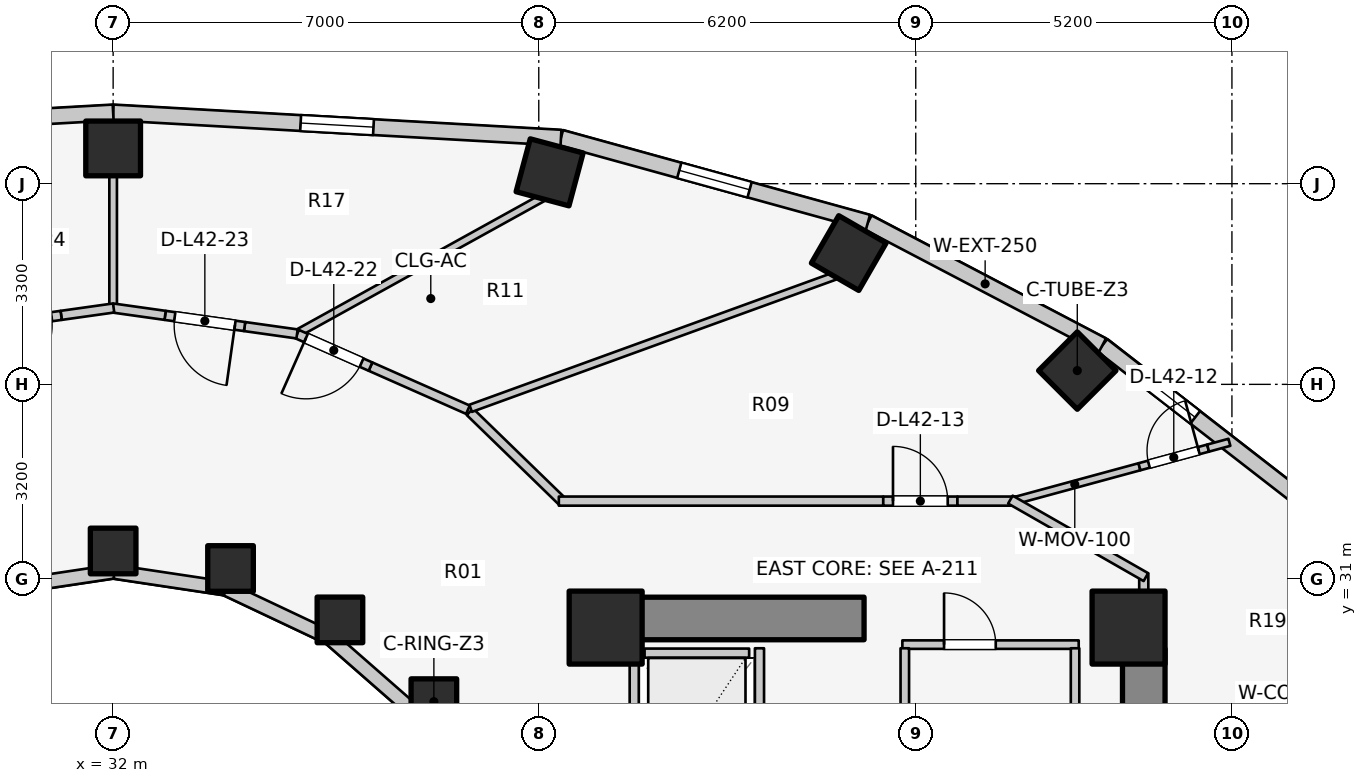
"""IFC4 building model, lengths in metres.
Left out: names, types, materials, properties, quantities, classifications, styles, units other than length and angle.
Written with IfcOpenShell. Run it as: python <this file> out.ifc"""

import sys

from ifc_helpers import new_model, si_unit, direction, frame, frame_2d, origin, origin_2d, place, context, subcontext, project, spatial, rectangle, extrude, element, fill, save


model = new_model("IFC4")
c1 = context("Model", 3, precision=1e-05, world=origin(), true_north=direction((0.0, 1.0)))
c2 = subcontext(c1, "Body", "Model", "MODEL_VIEW")
j1 = project(units=[si_unit("LENGTHUNIT", "METRE"), si_unit("PLANEANGLEUNIT", "RADIAN")], contexts=[c1])
p1 = place(None, origin())
s1 = spatial("IfcSite", under=j1, at=p1, CompositionType="ELEMENT")
p2 = place(p1, origin())
s2 = spatial("IfcBuilding", under=s1, at=p2, CompositionType="ELEMENT")
p3 = place(p2, frame((0.0, 0.0, 140.5)))
s3 = spatial("IfcBuildingStorey", under=s2, at=p3, CompositionType="ELEMENT", Elevation=140.5)
p4 = place(p3, frame((48.95, 17.05, 0.0), z_axis=(0.0, 0.0, 1.0), x_axis=(0.0, 1.0, 0.0)))
e1 = element("IfcWall", 1, at=p4, inside=s3, PredefinedType="SHEAR", context=c2, shape_type="SweptSolid", body=[
    extrude(rectangle(XDim=12.8, YDim=0.7, at=frame_2d((6.4, 0.0))), origin(), (0.0, 0.0, 1.0), 3.1),
])
p5 = place(p3, frame((39.85, 30.35, 0.0), z_axis=(0.0, 0.0, 1.0), x_axis=(1.0, 0.0, 0.0)))
e2 = element("IfcWall", 2, at=p5, inside=s3, PredefinedType="SHEAR", context=c2, shape_type="SweptSolid", body=[
    extrude(rectangle(XDim=4.5, YDim=0.7, at=frame_2d((2.25, 0.0))), origin(), (0.0, 0.0, 1.0), 3.1),
])
for number, where, z_axis, x_axis in (
    (3, (48.7, 30.2, 0.0), (0.0, 0.0, 1.0), (1.0, 0.0, 0.0)),
    (4, (40.1, 30.2, 0.0), (0.0, 0.0, 1.0), (1.0, 0.0, 0.0)),
):
    element("IfcColumn", number, at=place(p3, frame(where, z_axis=z_axis, x_axis=x_axis)), inside=s3, PredefinedType="COLUMN", context=c2, shape_type="SweptSolid", body=[
        extrude(rectangle(XDim=1.2, YDim=1.2, at=origin_2d()), origin(), (0.0, 0.0, 1.0), 3.1),
    ])
p6 = place(p3, frame((37.275, 28.982, 0.0), z_axis=(0.0, 0.0, 1.0), x_axis=(1.0, 0.0, 0.0)))
e5 = element("IfcColumn", 5, at=p6, inside=s3, PredefinedType="COLUMN", context=c2, shape_type="SweptSolid", body=[
    extrude(rectangle(XDim=0.75, YDim=0.75, at=origin_2d()), origin(), (0.0, 0.0, 1.0), 3.1),
])
p7 = place(p3, frame((47.857, 34.427, 0.0), z_axis=(0.0, 0.0, 1.0), x_axis=(0.707106781187, 0.707106781187, 0.0)))
e6 = element("IfcColumn", 6, at=p7, inside=s3, PredefinedType="COLUMN", context=c2, shape_type="SweptSolid", body=[
    extrude(rectangle(XDim=0.9, YDim=0.9, at=origin_2d()), origin(), (0.0, 0.0, 1.0), 3.1),
])
p8 = place(p3, frame((35.73, 30.327, 0.0), z_axis=(0.0, 0.0, 1.0), x_axis=(1.0, 0.0, 0.0)))
e7 = element("IfcColumn", 7, at=p8, inside=s3, PredefinedType="COLUMN", context=c2, shape_type="SweptSolid", body=[
    extrude(rectangle(XDim=0.75, YDim=0.75, at=origin_2d()), origin(), (0.0, 0.0, 1.0), 3.1),
])
p9 = place(p3, frame((44.098, 36.359, 0.0), z_axis=(0.0, 0.0, 1.0), x_axis=(0.5, 0.866025403784, 0.0)))
e8 = element("IfcColumn", 8, at=p9, inside=s3, PredefinedType="COLUMN", context=c2, shape_type="SweptSolid", body=[
    extrude(rectangle(XDim=0.9, YDim=0.9, at=origin_2d()), origin(), (0.0, 0.0, 1.0), 3.1),
])
p10 = place(p3, frame((33.931, 31.172, 0.0), z_axis=(0.0, 0.0, 1.0), x_axis=(1.0, 0.0, 0.0)))
e9 = element("IfcColumn", 9, at=p10, inside=s3, PredefinedType="COLUMN", context=c2, shape_type="SweptSolid", body=[
    extrude(rectangle(XDim=0.75, YDim=0.75, at=origin_2d()), origin(), (0.0, 0.0, 1.0), 3.1),
])
p11 = place(p3, frame((39.178, 37.687, 0.0), z_axis=(0.0, 0.0, 1.0), x_axis=(0.258819045103, 0.965925826289, 0.0)))
e10 = element("IfcColumn", 10, at=p11, inside=s3, PredefinedType="COLUMN", context=c2, shape_type="SweptSolid", body=[
    extrude(rectangle(XDim=0.9, YDim=0.9, at=origin_2d()), origin(), (0.0, 0.0, 1.0), 3.1),
])
p12 = place(p3, frame((32.0, 31.46, 0.0), z_axis=(0.0, 0.0, 1.0), x_axis=(1.0, 0.0, 0.0)))
e11 = element("IfcColumn", 11, at=p12, inside=s3, PredefinedType="COLUMN", context=c2, shape_type="SweptSolid", body=[
    extrude(rectangle(XDim=0.75, YDim=0.75, at=origin_2d()), origin(), (0.0, 0.0, 1.0), 3.1),
])
p13 = place(p3, frame((32.0, 38.08, 0.0), z_axis=(0.0, 0.0, 1.0), x_axis=(0.0, 1.0, 0.0)))
e12 = element("IfcColumn", 12, at=p13, inside=s3, PredefinedType="COLUMN", context=c2, shape_type="SweptSolid", body=[
    extrude(rectangle(XDim=0.9, YDim=0.9, at=origin_2d()), origin(), (0.0, 0.0, 1.0), 3.1),
])
p14 = place(p3, frame((37.035, 28.742, 0.0), z_axis=(0.0, 0.0, 1.0), x_axis=(-0.752576694707, 0.658504607869, 0.0)))
e13 = element("IfcWall", 13, at=p14, inside=s3, PredefinedType="STANDARD", context=c2, shape_type="SweptSolid", body=[
    extrude(rectangle(XDim=1.959, YDim=0.23, at=frame_2d((0.98, 0.0))), origin(), (0.0, 0.0, 1.0), 1.22),
])
p15 = place(p3, frame((35.56, 30.032, 0.0), z_axis=(0.0, 0.0, 1.0), x_axis=(-0.904179699603, 0.427152280606, 0.0)))
e14 = element("IfcWall", 14, at=p15, inside=s3, PredefinedType="STANDARD", context=c2, shape_type="SweptSolid", body=[
    extrude(rectangle(XDim=1.899, YDim=0.23, at=frame_2d((0.95, 0.0))), origin(), (0.0, 0.0, 1.0), 1.22),
])
for number, where, z_axis, x_axis in (
    (15, (33.843, 30.843, 0.0), (0.0, 0.0, 1.0), (-0.989, 0.149, 0.0)),
    (16, (32.0, 31.12, 0.0), (0.0, 0.0, 1.0), (-0.989, -0.149, 0.0)),
):
    element("IfcWall", number, at=place(p3, frame(where, z_axis=z_axis, x_axis=x_axis)), inside=s3, PredefinedType="STANDARD", context=c2, shape_type="SweptSolid", body=[
        extrude(rectangle(XDim=1.864, YDim=0.23, at=frame_2d((0.932, 0.0))), origin(), (0.0, 0.0, 1.0), 1.22),
    ])
p16 = place(p3, frame((51.619, 32.243, 0.0), z_axis=(0.0, 0.0, 1.0), x_axis=(-0.790185650662, 0.612867552973, 0.0)))
e17 = element("IfcWall", 17, at=p16, inside=s3, PredefinedType="STANDARD", context=c2, shape_type="SweptSolid", body=[
    extrude(rectangle(XDim=4.239, YDim=0.26, at=frame_2d((2.12, 0.0))), origin(), (0.0, 0.0, 1.0), 1.22),
])
p17 = place(p16, frame((2.308, 0.0, 0.15)))
e18 = element("IfcOpeningElement", 18, at=p17, cuts=e17, PredefinedType="OPENING", context=c2, shape_type="SweptSolid", body=[
    extrude(rectangle(XDim=1.2, YDim=0.9, at=frame_2d((0.6, 0.45))), frame((0.0, 0.14, 0.0), z_axis=(0.0, -1.0, 0.0), x_axis=(1.0, 0.0, 0.0)), (0.0, 0.0, 1.0), 0.28),
])
p18 = place(p3, frame((48.269, 34.842, 0.0), z_axis=(0.0, 0.0, 1.0), x_axis=(-0.885660265226, 0.464333818065, 0.0)))
e19 = element("IfcWall", 19, at=p18, inside=s3, PredefinedType="STANDARD", context=c2, shape_type="SweptSolid", body=[
    extrude(rectangle(XDim=4.354, YDim=0.26, at=frame_2d((2.177, 0.0))), origin(), (0.0, 0.0, 1.0), 1.22),
])
p19 = place(p3, frame((44.413, 36.863, 0.0), z_axis=(0.0, 0.0, 1.0), x_axis=(-0.963953455704, 0.26607092144, 0.0)))
e20 = element("IfcWall", 20, at=p19, inside=s3, PredefinedType="STANDARD", context=c2, shape_type="SweptSolid", body=[
    extrude(rectangle(XDim=5.237, YDim=0.26, at=frame_2d((2.618, 0.0))), origin(), (0.0, 0.0, 1.0), 1.22),
])
p20 = place(p19, frame((2.018, 0.0, 0.15)))
e21 = element("IfcOpeningElement", 21, at=p20, cuts=e20, PredefinedType="OPENING", context=c2, shape_type="SweptSolid", body=[
    extrude(rectangle(XDim=1.2, YDim=0.9, at=frame_2d((0.6, 0.45))), frame((0.0, 0.14, 0.0), z_axis=(0.0, -1.0, 0.0), x_axis=(1.0, 0.0, 0.0)), (0.0, 0.0, 1.0), 0.28),
])
p21 = place(p3, frame((39.365, 38.257, 0.0), z_axis=(0.0, 0.0, 1.0), x_axis=(-0.998417906562, 0.056228852534, 0.0)))
e22 = element("IfcWall", 22, at=p21, inside=s3, PredefinedType="STANDARD", context=c2, shape_type="SweptSolid", body=[
    extrude(rectangle(XDim=7.377, YDim=0.26, at=frame_2d((3.688, 0.0))), origin(), (0.0, 0.0, 1.0), 1.22),
])
p22 = place(p21, frame((3.088, 0.0, 0.15)))
e23 = element("IfcOpeningElement", 23, at=p22, cuts=e22, PredefinedType="OPENING", context=c2, shape_type="SweptSolid", body=[
    extrude(rectangle(XDim=1.2, YDim=0.9, at=frame_2d((0.6, 0.45))), frame((0.0, 0.14, 0.0), z_axis=(0.0, -1.0, 0.0), x_axis=(1.0, 0.0, 0.0)), (0.0, 0.0, 1.0), 0.28),
])
p23 = place(p3, frame((32.0, 38.671, 0.0), z_axis=(0.0, 0.0, 1.0), x_axis=(-0.998417906562, -0.056228852534, 0.0)))
e24 = element("IfcWall", 24, at=p23, inside=s3, PredefinedType="STANDARD", context=c2, shape_type="SweptSolid", body=[
    extrude(rectangle(XDim=7.377, YDim=0.26, at=frame_2d((3.688, 0.0))), origin(), (0.0, 0.0, 1.0), 1.22),
])
p24 = place(p23, frame((3.088, 0.0, 0.15)))
e25 = element("IfcOpeningElement", 25, at=p24, cuts=e24, PredefinedType="OPENING", context=c2, shape_type="SweptSolid", body=[
    extrude(rectangle(XDim=1.2, YDim=0.9, at=frame_2d((0.6, 0.45))), frame((0.0, 0.14, 0.0), z_axis=(0.0, -1.0, 0.0), x_axis=(1.0, 0.0, 0.0)), (0.0, 0.0, 1.0), 0.28),
])
p25 = place(p3, frame((40.74, 29.78, 0.0), z_axis=(0.0, 0.0, 1.0), x_axis=(1.0, 0.0, 0.0)))
e26 = element("IfcWall", 26, at=p25, inside=s3, PredefinedType="SOLIDWALL", context=c2, shape_type="SweptSolid", body=[
    extrude(rectangle(XDim=1.72, YDim=0.15, at=frame_2d((0.86, 0.0))), origin(), (0.0, 0.0, 1.0), 2.575),
])
for number, where, z_axis, x_axis in (
    (27, (40.57, 27.14, 0.0), (0.0, 0.0, 1.0), (0.0, 1.0, 0.0)),
    (28, (42.63, 27.14, 0.0), (0.0, 0.0, 1.0), (0.0, 1.0, 0.0)),
):
    element("IfcWall", number, at=place(p3, frame(where, z_axis=z_axis, x_axis=x_axis)), inside=s3, PredefinedType="SOLIDWALL", context=c2, shape_type="SweptSolid", body=[
        extrude(rectangle(XDim=2.72, YDim=0.15, at=frame_2d((1.36, 0.0))), origin(), (0.0, 0.0, 1.0), 2.575),
    ])
p26 = place(p3, frame((44.98, 29.92, 0.0), z_axis=(0.0, 0.0, 1.0), x_axis=(1.0, 0.0, 0.0)))
e29 = element("IfcWall", 29, at=p26, inside=s3, PredefinedType="PLUMBINGWALL", context=c2, shape_type="SweptSolid", body=[
    extrude(rectangle(XDim=2.9, YDim=0.14, at=frame_2d((1.45, 0.0))), origin(), (0.0, 0.0, 1.0), 2.575),
])
p27 = place(p26, frame((0.686, 0.0, 0.0)))
e30 = element("IfcOpeningElement", 30, at=p27, cuts=e29, PredefinedType="OPENING", context=c2, shape_type="SweptSolid", body=[
    extrude(rectangle(XDim=0.85, YDim=2.05, at=frame_2d((0.425, 1.025))), frame((0.0, 0.08, 0.0), z_axis=(0.0, -1.0, 0.0), x_axis=(1.0, 0.0, 0.0)), (0.0, 0.0, 1.0), 0.16),
])
for number, where, z_axis, x_axis in (
    (31, (45.02, 25.98, 0.0), (0.0, 0.0, 1.0), (0.0, 1.0, 0.0)),
    (32, (47.82, 25.98, 0.0), (0.0, 0.0, 1.0), (0.0, 1.0, 0.0)),
):
    element("IfcWall", number, at=place(p3, frame(where, z_axis=z_axis, x_axis=x_axis)), inside=s3, PredefinedType="PLUMBINGWALL", context=c2, shape_type="SweptSolid", body=[
        extrude(rectangle(XDim=3.88, YDim=0.14, at=frame_2d((1.94, 0.0))), origin(), (0.0, 0.0, 1.0), 2.575),
    ])
p28 = place(p3, frame((48.95, 29.8, 0.0), z_axis=(0.0, 0.0, 1.0), x_axis=(0.0, 1.0, 0.0)))
e33 = element("IfcWall", 33, at=p28, inside=s3, PredefinedType="PARTITIONING", context=c2, shape_type="SweptSolid", body=[
    extrude(rectangle(XDim=1.29, YDim=0.15, at=frame_2d((0.645, 0.0))), origin(), (0.0, 0.0, 1.0), 1.22),
])
p29 = place(p3, frame((46.752, 32.267, 0.0), z_axis=(0.0, 0.0, 1.0), x_axis=(0.964996026859, 0.262264500356, 0.0)))
e34 = element("IfcWall", 34, at=p29, inside=s3, PredefinedType="MOVABLE", context=c2, shape_type="SweptSolid", body=[
    extrude(rectangle(XDim=2.204, YDim=0.12, at=frame_2d((1.102, 0.0))), origin(), (0.0, 0.0, 1.0), 1.22),
])
p30 = place(p3, frame((48.879, 32.845, 0.0), z_axis=(0.0, 0.0, 1.0), x_axis=(0.964994566257, 0.262269874548, 0.0)))
e35 = element("IfcWall", 35, at=p30, inside=s3, PredefinedType="MOVABLE", context=c2, shape_type="SweptSolid", body=[
    extrude(rectangle(XDim=1.17, YDim=0.12, at=frame_2d((0.585, 0.0))), origin(), (0.0, 0.0, 1.0), 2.575),
])
p31 = place(p30, frame((0.16, 0.0, 0.0)))
e36 = element("IfcOpeningElement", 36, at=p31, cuts=e35, PredefinedType="OPENING", context=c2, shape_type="SweptSolid", body=[
    extrude(rectangle(XDim=0.85, YDim=2.05, at=frame_2d((0.425, 1.025))), frame((0.0, 0.07, 0.0), z_axis=(0.0, -1.0, 0.0), x_axis=(1.0, 0.0, 0.0)), (0.0, 0.0, 1.0), 0.14),
])
p32 = place(p3, frame((50.008, 33.152, 0.0), z_axis=(0.0, 0.0, 1.0), x_axis=(0.964996222189, 0.26226378164, 0.0)))
e37 = element("IfcWall", 37, at=p32, inside=s3, PredefinedType="MOVABLE", context=c2, shape_type="SweptSolid", body=[
    extrude(rectangle(XDim=0.363, YDim=0.12, at=frame_2d((0.182, 0.0))), origin(), (0.0, 0.0, 1.0), 2.575),
])
p33 = place(p3, frame((37.867, 33.749, 0.0), z_axis=(0.0, 0.0, 1.0), x_axis=(0.717419568599, -0.696641344302, 0.0)))
e38 = element("IfcWall", 38, at=p33, inside=s3, PredefinedType="PARTITIONING", context=c2, shape_type="SweptSolid", body=[
    extrude(rectangle(XDim=2.138, YDim=0.15, at=frame_2d((1.069, 0.0))), origin(), (0.0, 0.0, 1.0), 1.22),
])
p34 = place(p3, frame((39.33, 32.28, 0.0), z_axis=(0.0, 0.0, 1.0), x_axis=(1.0, 0.0, 0.0)))
e39 = element("IfcWall", 39, at=p34, inside=s3, PredefinedType="PARTITIONING", context=c2, shape_type="SweptSolid", body=[
    extrude(rectangle(XDim=5.336, YDim=0.15, at=frame_2d((2.668, 0.0))), origin(), (0.0, 0.0, 1.0), 1.22),
])
p35 = place(p3, frame((44.666, 32.28, 0.0), z_axis=(0.0, 0.0, 1.0), x_axis=(1.0, 0.0, 0.0)))
e40 = element("IfcWall", 40, at=p35, inside=s3, PredefinedType="PARTITIONING", context=c2, shape_type="SweptSolid", body=[
    extrude(rectangle(XDim=1.22, YDim=0.15, at=frame_2d((0.61, 0.0))), origin(), (0.0, 0.0, 1.0), 2.16),
])
p36 = place(p35, frame((0.16, 0.0, 0.0)))
e41 = element("IfcOpeningElement", 41, at=p36, cuts=e40, PredefinedType="OPENING", context=c2, shape_type="SweptSolid", body=[
    extrude(rectangle(XDim=0.9, YDim=2.1, at=frame_2d((0.45, 1.05))), frame((0.0, 0.085, 0.0), z_axis=(0.0, -1.0, 0.0), x_axis=(1.0, 0.0, 0.0)), (0.0, 0.0, 1.0), 0.17),
])
p37 = place(p3, frame((45.886, 32.28, 0.0), z_axis=(0.0, 0.0, 1.0), x_axis=(1.0, 0.0, 0.0)))
e42 = element("IfcWall", 42, at=p37, inside=s3, PredefinedType="PARTITIONING", context=c2, shape_type="SweptSolid", body=[
    extrude(rectangle(XDim=0.964, YDim=0.15, at=frame_2d((0.482, 0.0))), origin(), (0.0, 0.0, 1.0), 2.575),
])
p38 = place(p3, frame((46.757, 32.305, 0.0), z_axis=(0.0, 0.0, 1.0), x_axis=(0.867991349648, -0.496579315857, 0.0)))
e43 = element("IfcWall", 43, at=p38, inside=s3, PredefinedType="PARTITIONING", context=c2, shape_type="SweptSolid", body=[
    extrude(rectangle(XDim=2.567, YDim=0.15, at=frame_2d((1.283, 0.0))), origin(), (0.0, 0.0, 1.0), 1.22),
])
p39 = place(p3, frame((37.88, 33.806, 0.0), z_axis=(0.0, 0.0, 1.0), x_axis=(0.939901628116, 0.341445353557, 0.0)))
e44 = element("IfcWall", 44, at=p39, inside=s3, PredefinedType="PARTITIONING", context=c2, shape_type="SweptSolid", body=[
    extrude(rectangle(XDim=6.387, YDim=0.125, at=frame_2d((3.194, 0.0))), origin(), (0.0, 0.0, 1.0), 1.22),
])
p40 = place(p3, frame((35.065, 35.058, 0.0), z_axis=(0.0, 0.0, 1.0), x_axis=(0.875077338582, 0.48398311076, 0.0)))
e45 = element("IfcWall", 45, at=p40, inside=s3, PredefinedType="PARTITIONING", context=c2, shape_type="SweptSolid", body=[
    extrude(rectangle(XDim=4.573, YDim=0.125, at=frame_2d((2.287, 0.0))), origin(), (0.0, 0.0, 1.0), 1.22),
])
p41 = place(p3, frame((32.0, 35.511, 0.0), z_axis=(0.0, 0.0, 1.0), x_axis=(0.0, 1.0, 0.0)))
e46 = element("IfcWall", 46, at=p41, inside=s3, PredefinedType="PARTITIONING", context=c2, shape_type="SweptSolid", body=[
    extrude(rectangle(XDim=2.139, YDim=0.125, at=frame_2d((1.069, 0.0))), origin(), (0.0, 0.0, 1.0), 1.22),
])
p42 = place(p3, frame((37.835, 33.783, 0.0), z_axis=(0.0, 0.0, 1.0), x_axis=(-0.91447091359, 0.404651638077, 0.0)))
e47 = element("IfcWall", 47, at=p42, inside=s3, PredefinedType="PARTITIONING", context=c2, shape_type="SweptSolid", body=[
    extrude(rectangle(XDim=1.753, YDim=0.15, at=frame_2d((0.876, 0.0))), origin(), (0.0, 0.0, 1.0), 1.22),
])
p43 = place(p3, frame((36.232, 34.492, 0.0), z_axis=(0.0, 0.0, 1.0), x_axis=(-0.914382646268, 0.404851054345, 0.0)))
e48 = element("IfcWall", 48, at=p43, inside=s3, PredefinedType="PARTITIONING", context=c2, shape_type="SweptSolid", body=[
    extrude(rectangle(XDim=1.32, YDim=0.15, at=frame_2d((0.66, 0.0))), origin(), (0.0, 0.0, 1.0), 2.16),
])
p44 = place(p43, frame((0.16, 0.0, 0.0)))
e49 = element("IfcOpeningElement", 49, at=p44, cuts=e48, PredefinedType="OPENING", context=c2, shape_type="SweptSolid", body=[
    extrude(rectangle(XDim=1.0, YDim=2.1, at=frame_2d((0.5, 1.05))), frame((0.0, 0.085, 0.0), z_axis=(0.0, -1.0, 0.0), x_axis=(1.0, 0.0, 0.0)), (0.0, 0.0, 1.0), 0.17),
])
p45 = place(p3, frame((35.025, 35.029, 0.0), z_axis=(0.0, 0.0, 1.0), x_axis=(-0.990255371296, 0.139263418091, 0.0)))
e50 = element("IfcWall", 50, at=p45, inside=s3, PredefinedType="PARTITIONING", context=c2, shape_type="SweptSolid", body=[
    extrude(rectangle(XDim=0.871, YDim=0.15, at=frame_2d((0.436, 0.0))), origin(), (0.0, 0.0, 1.0), 2.575),
])
p46 = place(p3, frame((34.162, 35.151, 0.0), z_axis=(0.0, 0.0, 1.0), x_axis=(-0.990228663531, 0.139453196171, 0.0)))
e51 = element("IfcWall", 51, at=p46, inside=s3, PredefinedType="PARTITIONING", context=c2, shape_type="SweptSolid", body=[
    extrude(rectangle(XDim=1.32, YDim=0.15, at=frame_2d((0.66, 0.0))), origin(), (0.0, 0.0, 1.0), 2.575),
])
p47 = place(p46, frame((0.16, 0.0, 0.0)))
e52 = element("IfcOpeningElement", 52, at=p47, cuts=e51, PredefinedType="OPENING", context=c2, shape_type="SweptSolid", body=[
    extrude(rectangle(XDim=1.0, YDim=2.1, at=frame_2d((0.5, 1.05))), frame((0.0, 0.085, 0.0), z_axis=(0.0, -1.0, 0.0), x_axis=(1.0, 0.0, 0.0)), (0.0, 0.0, 1.0), 0.17),
])
for number, where, z_axis, x_axis in (
    (53, (32.855, 35.335, 0.0), (0.0, 0.0, 1.0), (-0.99, 0.139, 0.0)),
    (54, (32.008, 35.456, 0.0), (0.0, 0.0, 1.0), (-0.99, -0.139, 0.0)),
):
    element("IfcWall", number, at=place(p3, frame(where, z_axis=z_axis, x_axis=x_axis)), inside=s3, PredefinedType="PARTITIONING", context=c2, shape_type="SweptSolid", body=[
        extrude(rectangle(XDim=0.871, YDim=0.15, at=frame_2d((0.436, 0.0))), origin(), (0.0, 0.0, 1.0), 1.22),
    ])
p48 = place(p3, frame((31.145, 35.335, 0.0), z_axis=(0.0, 0.0, 1.0), x_axis=(-0.990228663531, -0.139453196171, 0.0)))
e55 = element("IfcWall", 55, at=p48, inside=s3, PredefinedType="PARTITIONING", context=c2, shape_type="SweptSolid", body=[
    extrude(rectangle(XDim=1.32, YDim=0.15, at=frame_2d((0.66, 0.0))), origin(), (0.0, 0.0, 1.0), 2.575),
])
p49 = place(p48, frame((0.16, 0.0, 0.0)))
e56 = element("IfcOpeningElement", 56, at=p49, cuts=e55, PredefinedType="OPENING", context=c2, shape_type="SweptSolid", body=[
    extrude(rectangle(XDim=1.0, YDim=2.1, at=frame_2d((0.5, 1.05))), frame((0.0, 0.085, 0.0), z_axis=(0.0, -1.0, 0.0), x_axis=(1.0, 0.0, 0.0)), (0.0, 0.0, 1.0), 0.17),
])
p50 = place(p17, origin())
e57 = element("IfcWindow", 57, at=p50, inside=s3, PartitioningType="SINGLE_PANEL", PredefinedType="WINDOW", context=c2, shape_type="SweptSolid", body=[
    extrude(rectangle(XDim=1.2, YDim=0.9, at=frame_2d((0.6, 0.45))), frame((0.0, 0.03, 0.0), z_axis=(0.0, -1.0, 0.0), x_axis=(1.0, 0.0, 0.0)), (0.0, 0.0, 1.0), 0.06),
])
fill(e18, e57)
p51 = place(p20, origin())
e58 = element("IfcWindow", 58, at=p51, inside=s3, PartitioningType="SINGLE_PANEL", PredefinedType="WINDOW", context=c2, shape_type="SweptSolid", body=[
    extrude(rectangle(XDim=1.2, YDim=0.9, at=frame_2d((0.6, 0.45))), frame((0.0, 0.03, 0.0), z_axis=(0.0, -1.0, 0.0), x_axis=(1.0, 0.0, 0.0)), (0.0, 0.0, 1.0), 0.06),
])
fill(e21, e58)
p52 = place(p22, origin())
e59 = element("IfcWindow", 59, at=p52, inside=s3, PartitioningType="SINGLE_PANEL", PredefinedType="WINDOW", context=c2, shape_type="SweptSolid", body=[
    extrude(rectangle(XDim=1.2, YDim=0.9, at=frame_2d((0.6, 0.45))), frame((0.0, 0.03, 0.0), z_axis=(0.0, -1.0, 0.0), x_axis=(1.0, 0.0, 0.0)), (0.0, 0.0, 1.0), 0.06),
])
fill(e23, e59)
p53 = place(p27, origin())
e60 = element("IfcDoor", 60, at=p53, inside=s3, OperationType="SINGLE_SWING_LEFT", PredefinedType="DOOR", context=c2, shape_type="SweptSolid", body=[
    extrude(rectangle(XDim=0.85, YDim=2.05, at=frame_2d((0.425, 1.025))), frame((0.0, 0.025, 0.0), z_axis=(0.0, -1.0, 0.0), x_axis=(1.0, 0.0, 0.0)), (0.0, 0.0, 1.0), 0.05),
])
fill(e30, e60)
p54 = place(p31, origin())
e61 = element("IfcDoor", 61, at=p54, inside=s3, OperationType="SINGLE_SWING_RIGHT", PredefinedType="DOOR", context=c2, shape_type="SweptSolid", body=[
    extrude(rectangle(XDim=0.85, YDim=2.05, at=frame_2d((0.425, 1.025))), frame((0.0, 0.025, 0.0), z_axis=(0.0, -1.0, 0.0), x_axis=(1.0, 0.0, 0.0)), (0.0, 0.0, 1.0), 0.05),
])
fill(e36, e61)
p55 = place(p36, origin())
e62 = element("IfcDoor", 62, at=p55, inside=s3, OperationType="SINGLE_SWING_LEFT", PredefinedType="DOOR", context=c2, shape_type="SweptSolid", body=[
    extrude(rectangle(XDim=0.9, YDim=2.1, at=frame_2d((0.45, 1.05))), frame((0.0, 0.025, 0.0), z_axis=(0.0, -1.0, 0.0), x_axis=(1.0, 0.0, 0.0)), (0.0, 0.0, 1.0), 0.05),
])
fill(e41, e62)
p56 = place(p44, origin())
e63 = element("IfcDoor", 63, at=p56, inside=s3, OperationType="SINGLE_SWING_RIGHT", PredefinedType="DOOR", context=c2, shape_type="SweptSolid", body=[
    extrude(rectangle(XDim=1.0, YDim=2.1, at=frame_2d((0.5, 1.05))), frame((0.0, 0.025, 0.0), z_axis=(0.0, -1.0, 0.0), x_axis=(1.0, 0.0, 0.0)), (0.0, 0.0, 1.0), 0.05),
])
fill(e49, e63)
p57 = place(p47, origin())
e64 = element("IfcDoor", 64, at=p57, inside=s3, OperationType="SINGLE_SWING_LEFT", PredefinedType="DOOR", context=c2, shape_type="SweptSolid", body=[
    extrude(rectangle(XDim=1.0, YDim=2.1, at=frame_2d((0.5, 1.05))), frame((0.0, 0.025, 0.0), z_axis=(0.0, -1.0, 0.0), x_axis=(1.0, 0.0, 0.0)), (0.0, 0.0, 1.0), 0.05),
])
fill(e52, e64)
save(model, sys.argv[1])
